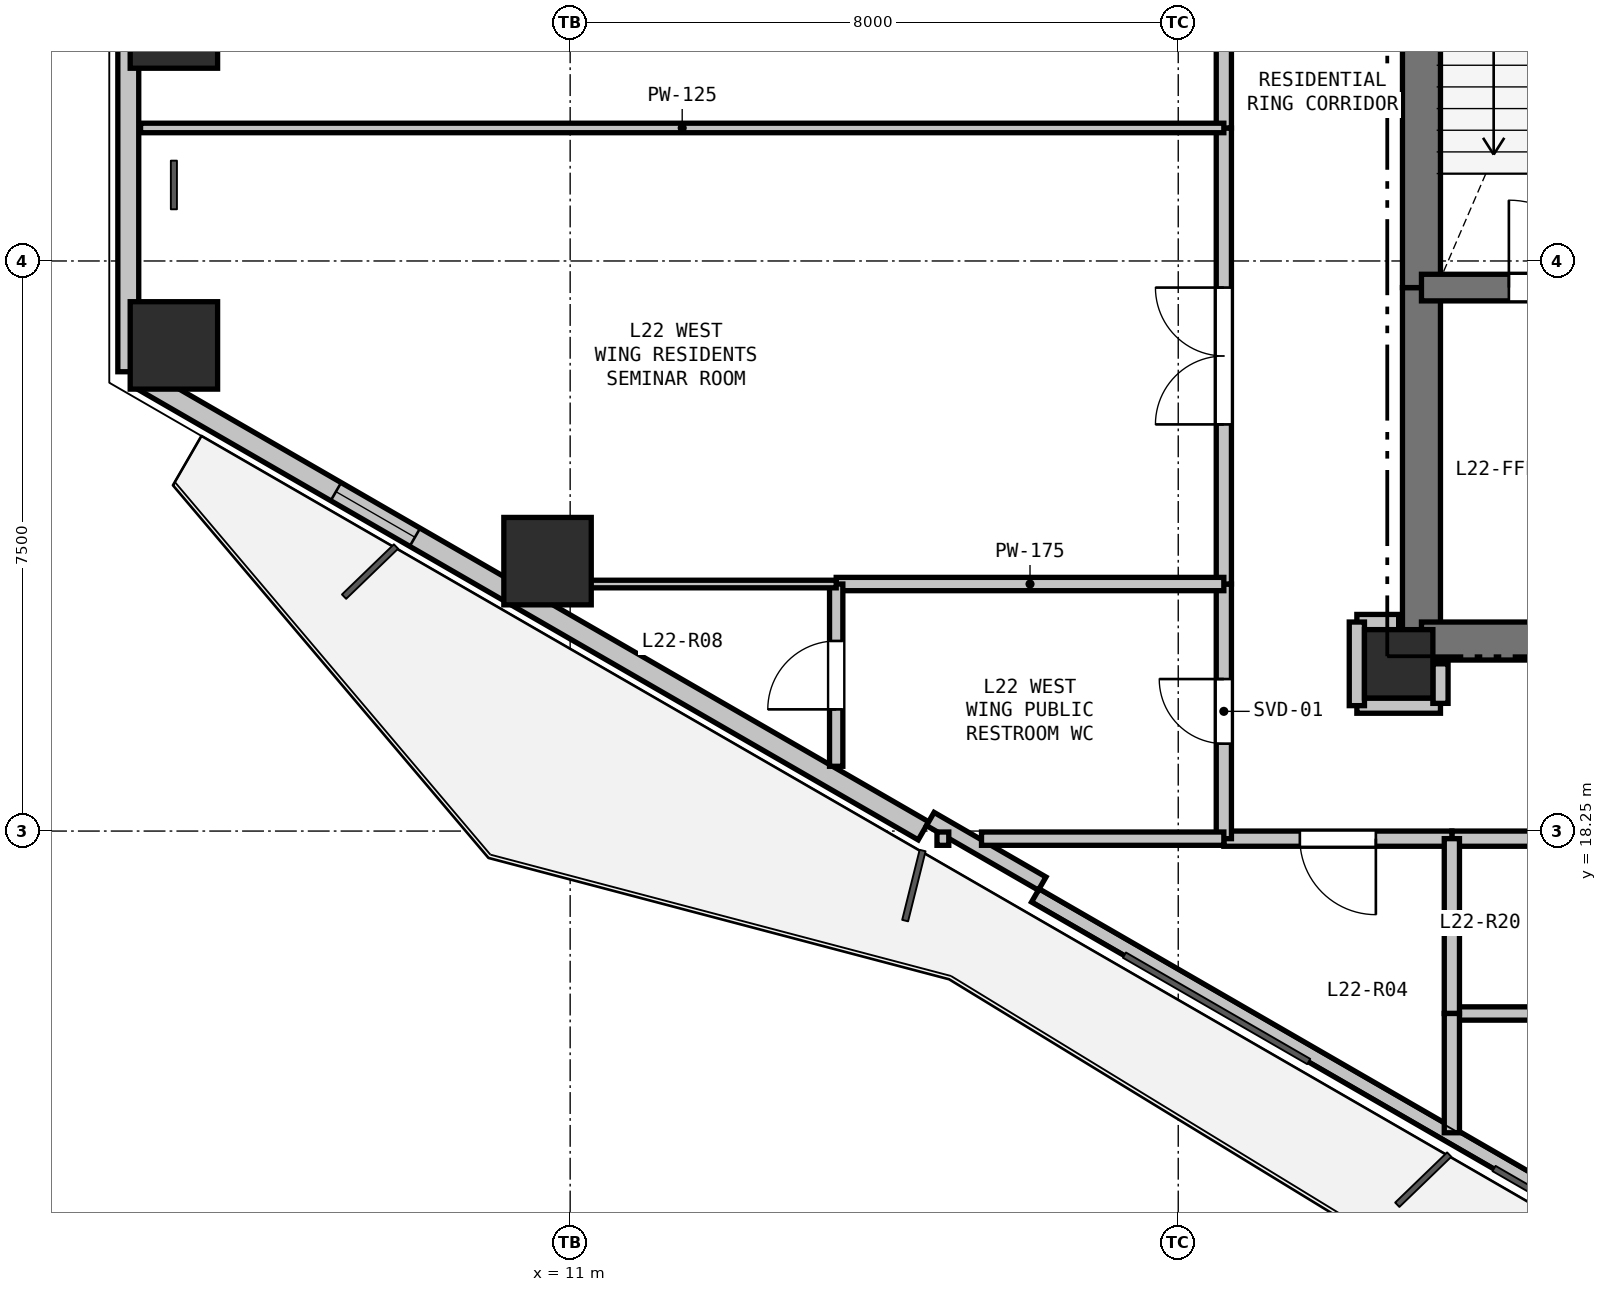
"""IFC4 building model, lengths in metres.
Left out: names, types, materials, properties, quantities, classifications, styles, units other than length and angle.
Written with IfcOpenShell. Run it as: python <this file> out.ifc"""

import sys

from ifc_helpers import new_model, si_unit, direction, frame, frame_2d, origin, origin_2d, place, context, subcontext, project, spatial, rectangle, hollow_rectangle, extrude, element, fill, save


model = new_model("IFC4")
c1 = context("Model", 3, precision=1e-05, world=origin(), true_north=direction((0.0, 1.0)))
c2 = subcontext(c1, "Body", "Model", "MODEL_VIEW")
j1 = project(units=[si_unit("LENGTHUNIT", "METRE"), si_unit("PLANEANGLEUNIT", "RADIAN")], contexts=[c1])
p1 = place(None, origin())
s1 = spatial("IfcSite", under=j1, at=p1, CompositionType="ELEMENT")
p2 = place(p1, origin())
s2 = spatial("IfcBuilding", under=s1, at=p2, CompositionType="ELEMENT")
p3 = place(p2, frame((0.0, 0.0, 83.4)))
s3 = spatial("IfcBuildingStorey", under=s2, at=p3, CompositionType="ELEMENT", Elevation=83.4)
p4 = place(p3, frame((21.9, 20.45, 0.0), z_axis=(0.0, 0.0, 1.0), x_axis=(1.0, 0.0, 0.0)))
e1 = element("IfcColumn", 1, at=p4, inside=s3, PredefinedType="COLUMN", context=c2, shape_type="SweptSolid", body=[
    extrude(rectangle(XDim=0.9, YDim=0.9, at=origin_2d()), origin(), (0.0, 0.0, 1.0), 3.3),
])
for number, where, z_axis, x_axis in (
    (2, (5.787, 28.861, 0.0), (0.0, 0.0, 1.0), (1.0, 0.0, 0.0)),
    (3, (10.702, 21.801, 0.0), (0.0, 0.0, 1.0), (1.0, 0.0, 0.0)),
    (4, (5.787, 24.639, 0.0), (0.0, 0.0, 1.0), (1.0, 0.0, 0.0)),
):
    element("IfcColumn", number, at=place(p3, frame(where, z_axis=z_axis, x_axis=x_axis)), inside=s3, PredefinedType="COLUMN", context=c2, shape_type="SweptSolid", body=[
        extrude(hollow_rectangle(XDim=1.15, YDim=1.15, WallThickness=0.032, at=origin_2d()), origin(), (0.0, 0.0, 1.0), 3.3),
    ])
p5 = place(p3, frame((5.187, 24.293, 0.0), z_axis=(0.0, 0.0, 1.0), x_axis=(0.0, 1.0, 0.0)))
e5 = element("IfcWall", 5, at=p5, inside=s3, PredefinedType="SOLIDWALL", context=c2, shape_type="SweptSolid", body=[
    extrude(rectangle(XDim=4.915, YDim=0.275, at=frame_2d((2.457, 0.0))), origin(), (0.0, 0.0, 1.0), 2.67),
])
p6 = place(p3, frame((26.845, 11.788, 0.0), z_axis=(0.0, 0.0, 1.0), x_axis=(-0.866027010039, 0.499997217876, 0.0)))
e6 = element("IfcWall", 6, at=p6, inside=s3, PredefinedType="PARAPET", context=c2, shape_type="SweptSolid", body=[
    extrude(rectangle(XDim=11.229, YDim=0.2, at=frame_2d((5.615, 0.0))), origin(), (0.0, 0.0, 1.0), 0.2),
])
p7 = place(p3, frame((15.648, 18.253, 0.0), z_axis=(0.0, 0.0, 1.0), x_axis=(-0.866023023012, 0.500004123596, 0.0)))
e7 = element("IfcWall", 7, at=p7, inside=s3, PredefinedType="SOLIDWALL", context=c2, shape_type="SweptSolid", body=[
    extrude(rectangle(XDim=11.93, YDim=0.275, at=frame_2d((5.965, 0.0))), origin(), (0.0, 0.0, 1.0), 2.67),
])
p8 = place(p7, frame((7.725, 0.0, 0.9)))
e8 = element("IfcOpeningElement", 8, at=p8, cuts=e7, PredefinedType="OPENING", context=c2, shape_type="SweptSolid", body=[
    extrude(rectangle(XDim=1.2, YDim=1.5, at=frame_2d((0.6, 0.75))), frame((0.0, 0.147, 0.0), z_axis=(0.0, -1.0, 0.0), x_axis=(1.0, 0.0, 0.0)), (0.0, 0.0, 1.0), 0.295),
])
p9 = place(p3, frame((17.21, 17.559, 0.0), z_axis=(0.0, 0.0, 1.0), x_axis=(-0.866025371046, 0.500000056704, 0.0)))
e9 = element("IfcWall", 9, at=p9, inside=s3, PredefinedType="PARAPET", context=c2, shape_type="SweptSolid", body=[
    extrude(rectangle(XDim=1.7, YDim=0.2, at=frame_2d((0.85, 0.0))), origin(), (0.0, 0.0, 1.0), 2.67),
])
p10 = place(p3, frame((22.2, 20.75, 0.0), z_axis=(0.0, 0.0, 1.0), x_axis=(0.0, 1.0, 0.0)))
e10 = element("IfcWall", 10, at=p10, inside=s3, PredefinedType="SHEAR", context=c2, shape_type="SweptSolid", body=[
    extrude(rectangle(XDim=4.65, YDim=0.5, at=frame_2d((2.325, 0.0))), origin(), (0.0, 0.0, 1.0), 3.05),
])
p11 = place(p3, frame((22.2, 25.4, 0.0), z_axis=(0.0, 0.0, 1.0), x_axis=(0.0, 1.0, 0.0)))
e11 = element("IfcWall", 11, at=p11, inside=s3, PredefinedType="SHEAR", context=c2, shape_type="SweptSolid", body=[
    extrude(rectangle(XDim=7.35, YDim=0.5, at=frame_2d((3.675, 0.0))), origin(), (0.0, 0.0, 1.0), 3.05),
])
p12 = place(p3, frame((25.65, 20.75, 0.0), z_axis=(0.0, 0.0, 1.0), x_axis=(-1.0, 0.0, 0.0)))
e12 = element("IfcWall", 12, at=p12, inside=s3, PredefinedType="SHEAR", context=c2, shape_type="SweptSolid", body=[
    extrude(rectangle(XDim=3.45, YDim=0.5, at=frame_2d((1.725, 0.0))), origin(), (0.0, 0.0, 1.0), 3.05),
])
p13 = place(p12, frame((0.65, 0.0, 0.0)))
e13 = element("IfcOpeningElement", 13, at=p13, cuts=e12, PredefinedType="OPENING", context=c2, shape_type="SweptSolid", body=[
    extrude(rectangle(XDim=1.15, YDim=2.15, at=frame_2d((0.575, 1.075))), frame((0.0, 0.26, 0.0), z_axis=(0.0, -1.0, 0.0), x_axis=(1.0, 0.0, 0.0)), (0.0, 0.0, 1.0), 0.52),
])
p14 = place(p3, frame((22.2, 25.4, 0.0), z_axis=(0.0, 0.0, 1.0), x_axis=(1.0, 0.0, 0.0)))
e14 = element("IfcWall", 14, at=p14, inside=s3, PredefinedType="SHEAR", context=c2, shape_type="SweptSolid", body=[
    extrude(rectangle(XDim=3.45, YDim=0.35, at=frame_2d((1.725, 0.0))), origin(), (0.0, 0.0, 1.0), 3.05),
])
p15 = place(p14, frame((1.15, 0.0, 0.0)))
e15 = element("IfcOpeningElement", 15, at=p15, cuts=e14, PredefinedType="OPENING", context=c2, shape_type="SweptSolid", body=[
    extrude(rectangle(XDim=1.15, YDim=2.15, at=frame_2d((0.575, 1.075))), frame((0.0, 0.185, 0.0), z_axis=(0.0, -1.0, 0.0), x_axis=(1.0, 0.0, 0.0)), (0.0, 0.0, 1.0), 0.37),
])
p16 = place(p3, frame((21.35, 19.9, 0.0), z_axis=(0.0, 0.0, 1.0), x_axis=(1.0, 0.0, 0.0)))
e16 = element("IfcWall", 16, at=p16, inside=s3, PredefinedType="PARTITIONING", context=c2, shape_type="SweptSolid", body=[
    extrude(rectangle(XDim=1.1, YDim=0.2, at=frame_2d((0.55, 0.0))), origin(), (0.0, 0.0, 1.0), 2.423),
])
p17 = place(p3, frame((22.45, 19.93, 0.0), z_axis=(0.0, 0.0, 1.0), x_axis=(0.0, 1.0, 0.0)))
e17 = element("IfcWall", 17, at=p17, inside=s3, PredefinedType="PARTITIONING", context=c2, shape_type="SweptSolid", body=[
    extrude(rectangle(XDim=0.52, YDim=0.2, at=frame_2d((0.26, 0.0))), origin(), (0.0, 0.0, 1.0), 2.423),
])
p18 = place(p3, frame((25.0, 18.15, 0.0), z_axis=(0.0, 0.0, 1.0), x_axis=(-1.0, 0.0, 0.0)))
e18 = element("IfcWall", 18, at=p18, inside=s3, PredefinedType="PARTITIONING", context=c2, shape_type="SweptSolid", body=[
    extrude(rectangle(XDim=2.4, YDim=0.2, at=frame_2d((1.2, 0.0))), origin(), (0.0, 0.0, 1.0), 2.423),
])
p19 = place(p3, frame((22.6, 18.15, 0.0), z_axis=(0.0, 0.0, 1.0), x_axis=(-1.0, 0.0, 0.0)))
e19 = element("IfcWall", 19, at=p19, inside=s3, PredefinedType="PARTITIONING", context=c2, shape_type="SweptSolid", body=[
    extrude(rectangle(XDim=3.0, YDim=0.2, at=frame_2d((1.5, 0.0))), origin(), (0.0, 0.0, 1.0), 3.05),
])
p20 = place(p19, frame((1.0, 0.0, 0.0)))
e20 = element("IfcOpeningElement", 20, at=p20, cuts=e19, PredefinedType="OPENING", context=c2, shape_type="SweptSolid", body=[
    extrude(rectangle(XDim=1.0, YDim=2.15, at=frame_2d((0.5, 1.075))), frame((0.0, 0.11, 0.0), z_axis=(0.0, -1.0, 0.0), x_axis=(1.0, 0.0, 0.0)), (0.0, 0.0, 1.0), 0.22),
])
p21 = place(p3, frame((19.6, 18.15, 0.0), z_axis=(0.0, 0.0, 1.0), x_axis=(0.0, 1.0, 0.0)))
e21 = element("IfcWall", 21, at=p21, inside=s3, PredefinedType="PARTITIONING", context=c2, shape_type="SweptSolid", body=[
    extrude(rectangle(XDim=3.35, YDim=0.2, at=frame_2d((1.675, 0.0))), origin(), (0.0, 0.0, 1.0), 2.423),
])
p22 = place(p21, frame((1.25, 0.0, 0.0)))
e22 = element("IfcOpeningElement", 22, at=p22, cuts=e21, PredefinedType="OPENING", context=c2, shape_type="SweptSolid", body=[
    extrude(rectangle(XDim=0.85, YDim=2.1, at=frame_2d((0.425, 1.05))), frame((0.0, 0.11, 0.0), z_axis=(0.0, -1.0, 0.0), x_axis=(1.0, 0.0, 0.0)), (0.0, 0.0, 1.0), 0.22),
])
p23 = place(p3, frame((19.6, 21.5, 0.0), z_axis=(0.0, 0.0, 1.0), x_axis=(0.0, 1.0, 0.0)))
e23 = element("IfcWall", 23, at=p23, inside=s3, PredefinedType="PARTITIONING", context=c2, shape_type="SweptSolid", body=[
    extrude(rectangle(XDim=6.0, YDim=0.2, at=frame_2d((3.0, 0.0))), origin(), (0.0, 0.0, 1.0), 3.05),
])
p24 = place(p23, frame((2.1, 0.0, 0.0)))
e24 = element("IfcOpeningElement", 24, at=p24, cuts=e23, PredefinedType="OPENING", context=c2, shape_type="SweptSolid", body=[
    extrude(rectangle(XDim=1.8, YDim=2.2, at=frame_2d((0.9, 1.1))), frame((0.0, 0.11, 0.0), z_axis=(0.0, -1.0, 0.0), x_axis=(1.0, 0.0, 0.0)), (0.0, 0.0, 1.0), 0.22),
])
p25 = place(p3, frame((19.6, 27.5, 0.0), z_axis=(0.0, 0.0, 1.0), x_axis=(0.0, 1.0, 0.0)))
e25 = element("IfcWall", 25, at=p25, inside=s3, PredefinedType="PARTITIONING", context=c2, shape_type="SweptSolid", body=[
    extrude(rectangle(XDim=7.85, YDim=0.2, at=frame_2d((3.925, 0.0))), origin(), (0.0, 0.0, 1.0), 2.423),
])
p26 = place(p25, frame((3.025, 0.0, 0.0)))
e26 = element("IfcOpeningElement", 26, at=p26, cuts=e25, PredefinedType="OPENING", context=c2, shape_type="SweptSolid", body=[
    extrude(rectangle(XDim=1.8, YDim=2.2, at=frame_2d((0.9, 1.1))), frame((0.0, 0.11, 0.0), z_axis=(0.0, -1.0, 0.0), x_axis=(1.0, 0.0, 0.0)), (0.0, 0.0, 1.0), 0.22),
])
p27 = place(p3, frame((21.9, 21.0, 0.0), z_axis=(0.0, 0.0, 1.0), x_axis=(-1.0, 0.0, 0.0)))
e27 = element("IfcWall", 27, at=p27, inside=s3, PredefinedType="PARTITIONING", context=c2, shape_type="SweptSolid", body=[
    extrude(rectangle(XDim=0.55, YDim=0.2, at=frame_2d((0.275, 0.0))), origin(), (0.0, 0.0, 1.0), 2.498),
])
p28 = place(p3, frame((21.35, 21.0, 0.0), z_axis=(0.0, 0.0, 1.0), x_axis=(0.0, -1.0, 0.0)))
e28 = element("IfcWall", 28, at=p28, inside=s3, PredefinedType="PARTITIONING", context=c2, shape_type="SweptSolid", body=[
    extrude(rectangle(XDim=1.1, YDim=0.2, at=frame_2d((0.55, 0.0))), origin(), (0.0, 0.0, 1.0), 2.423),
])
p29 = place(p3, frame((14.5, 21.5, 0.0), z_axis=(0.0, 0.0, 1.0), x_axis=(1.0, 0.0, 0.0)))
e29 = element("IfcWall", 29, at=p29, inside=s3, PredefinedType="PLUMBINGWALL", context=c2, shape_type="SweptSolid", body=[
    extrude(rectangle(XDim=5.1, YDim=0.175, at=frame_2d((2.55, 0.0))), origin(), (0.0, 0.0, 1.0), 2.423),
])
p30 = place(p3, frame((19.6, 18.15, 0.0), z_axis=(0.0, 0.0, 1.0), x_axis=(-1.0, 0.0, 0.0)))
e30 = element("IfcWall", 30, at=p30, inside=s3, PredefinedType="PLUMBINGWALL", context=c2, shape_type="SweptSolid", body=[
    extrude(rectangle(XDim=3.188, YDim=0.175, at=frame_2d((1.594, 0.0))), origin(), (0.0, 0.0, 1.0), 2.365),
])
p31 = place(p3, frame((15.981, 18.15, 0.0), z_axis=(0.0, 0.0, 1.0), x_axis=(-1.0, 0.0, 0.0)))
e31 = element("IfcWall", 31, at=p31, inside=s3, PredefinedType="PLUMBINGWALL", context=c2, shape_type="SweptSolid", body=[
    extrude(rectangle(XDim=0.155, YDim=0.175, at=frame_2d((0.078, 0.0))), origin(), (0.0, 0.0, 1.0), 3.05),
])
p32 = place(p3, frame((14.5, 19.102, 0.0), z_axis=(0.0, 0.0, 1.0), x_axis=(0.0, 1.0, 0.0)))
e32 = element("IfcWall", 32, at=p32, inside=s3, PredefinedType="PLUMBINGWALL", context=c2, shape_type="SweptSolid", body=[
    extrude(rectangle(XDim=2.398, YDim=0.175, at=frame_2d((1.199, 0.0))), origin(), (0.0, 0.0, 1.0), 2.365),
])
p33 = place(p32, frame((0.749, 0.0, 0.0)))
e33 = element("IfcOpeningElement", 33, at=p33, cuts=e32, PredefinedType="OPENING", context=c2, shape_type="SweptSolid", body=[
    extrude(rectangle(XDim=0.9, YDim=2.1, at=frame_2d((0.45, 1.05))), frame((0.0, 0.097, 0.0), z_axis=(0.0, -1.0, 0.0), x_axis=(1.0, 0.0, 0.0)), (0.0, 0.0, 1.0), 0.195),
])
p34 = place(p3, frame((25.0, 15.85, 0.0), z_axis=(0.0, 0.0, 1.0), x_axis=(-1.0, 0.0, 0.0)))
e34 = element("IfcWall", 34, at=p34, inside=s3, PredefinedType="PLUMBINGWALL", context=c2, shape_type="SweptSolid", body=[
    extrude(rectangle(XDim=2.4, YDim=0.175, at=frame_2d((1.2, 0.0))), origin(), (0.0, 0.0, 1.0), 3.05),
])
p35 = place(p3, frame((22.6, 15.85, 0.0), z_axis=(0.0, 0.0, 1.0), x_axis=(0.0, 1.0, 0.0)))
e35 = element("IfcWall", 35, at=p35, inside=s3, PredefinedType="PARTITIONING", context=c2, shape_type="SweptSolid", body=[
    extrude(rectangle(XDim=2.3, YDim=0.2, at=frame_2d((1.15, 0.0))), origin(), (0.0, 0.0, 1.0), 3.05),
])
p36 = place(p3, frame((22.6, 15.85, 0.0), z_axis=(0.0, 0.0, 1.0), x_axis=(0.0, -1.0, 0.0)))
e36 = element("IfcWall", 36, at=p36, inside=s3, PredefinedType="PARTITIONING", context=c2, shape_type="SweptSolid", body=[
    extrude(rectangle(XDim=1.569, YDim=0.2, at=frame_2d((0.785, 0.0))), origin(), (0.0, 0.0, 1.0), 2.365),
])
p37 = place(p3, frame((19.6, 27.5, 0.0), z_axis=(0.0, 0.0, 1.0), x_axis=(-1.0, 0.0, 0.0)))
e37 = element("IfcWall", 37, at=p37, inside=s3, PredefinedType="PARTITIONING", context=c2, shape_type="SweptSolid", body=[
    extrude(rectangle(XDim=14.252, YDim=0.125, at=frame_2d((7.126, 0.0))), origin(), (0.0, 0.0, 1.0), 2.66),
])
p38 = place(p3, frame((14.5, 21.5, 0.0), z_axis=(0.0, 0.0, 1.0), x_axis=(-1.0, 0.0, 0.0)))
e38 = element("IfcWall", 38, at=p38, inside=s3, PredefinedType="PARTITIONING", context=c2, shape_type="SweptSolid", body=[
    extrude(rectangle(XDim=4.182, YDim=0.1, at=frame_2d((2.091, 0.0))), origin(), (0.0, 0.0, 1.0), 2.365),
])
p39 = place(p8, origin())
e39 = element("IfcWindow", 39, at=p39, inside=s3, PartitioningType="SINGLE_PANEL", PredefinedType="WINDOW", context=c2, shape_type="SweptSolid", body=[
    extrude(rectangle(XDim=1.2, YDim=1.5, at=frame_2d((0.6, 0.75))), frame((0.0, 0.03, 0.0), z_axis=(0.0, -1.0, 0.0), x_axis=(1.0, 0.0, 0.0)), (0.0, 0.0, 1.0), 0.06),
])
fill(e8, e39)
p40 = place(p15, origin())
e40 = element("IfcDoor", 40, at=p40, inside=s3, OperationType="SINGLE_SWING_LEFT", PredefinedType="DOOR", context=c2, shape_type="SweptSolid", body=[
    extrude(rectangle(XDim=1.15, YDim=2.15, at=frame_2d((0.575, 1.075))), frame((0.0, 0.025, 0.0), z_axis=(0.0, -1.0, 0.0), x_axis=(1.0, 0.0, 0.0)), (0.0, 0.0, 1.0), 0.05),
])
fill(e15, e40)
p41 = place(p22, origin())
e41 = element("IfcDoor", 41, at=p41, inside=s3, OperationType="SINGLE_SWING_RIGHT", PredefinedType="DOOR", context=c2, shape_type="SweptSolid", body=[
    extrude(rectangle(XDim=0.85, YDim=2.1, at=frame_2d((0.425, 1.05))), frame((0.0, 0.025, 0.0), z_axis=(0.0, -1.0, 0.0), x_axis=(1.0, 0.0, 0.0)), (0.0, 0.0, 1.0), 0.05),
])
fill(e22, e41)
p42 = place(p20, origin())
e42 = element("IfcDoor", 42, at=p42, inside=s3, OperationType="SINGLE_SWING_LEFT", PredefinedType="DOOR", context=c2, shape_type="SweptSolid", body=[
    extrude(rectangle(XDim=1.0, YDim=2.15, at=frame_2d((0.5, 1.075))), frame((0.0, 0.025, 0.0), z_axis=(0.0, -1.0, 0.0), x_axis=(1.0, 0.0, 0.0)), (0.0, 0.0, 1.0), 0.05),
])
fill(e20, e42)
p43 = place(p24, origin())
e43 = element("IfcDoor", 43, at=p43, inside=s3, OperationType="DOUBLE_DOOR_SINGLE_SWING", PredefinedType="DOOR", context=c2, shape_type="SweptSolid", body=[
    extrude(rectangle(XDim=1.8, YDim=2.2, at=frame_2d((0.9, 1.1))), frame((0.0, 0.025, 0.0), z_axis=(0.0, -1.0, 0.0), x_axis=(1.0, 0.0, 0.0)), (0.0, 0.0, 1.0), 0.05),
])
fill(e24, e43)
p44 = place(p33, origin())
e44 = element("IfcDoor", 44, at=p44, inside=s3, OperationType="SINGLE_SWING_LEFT", PredefinedType="DOOR", context=c2, shape_type="SweptSolid", body=[
    extrude(rectangle(XDim=0.9, YDim=2.1, at=frame_2d((0.45, 1.05))), frame((0.0, 0.025, 0.0), z_axis=(0.0, -1.0, 0.0), x_axis=(1.0, 0.0, 0.0)), (0.0, 0.0, 1.0), 0.05),
])
fill(e33, e44)
save(model, sys.argv[1])
